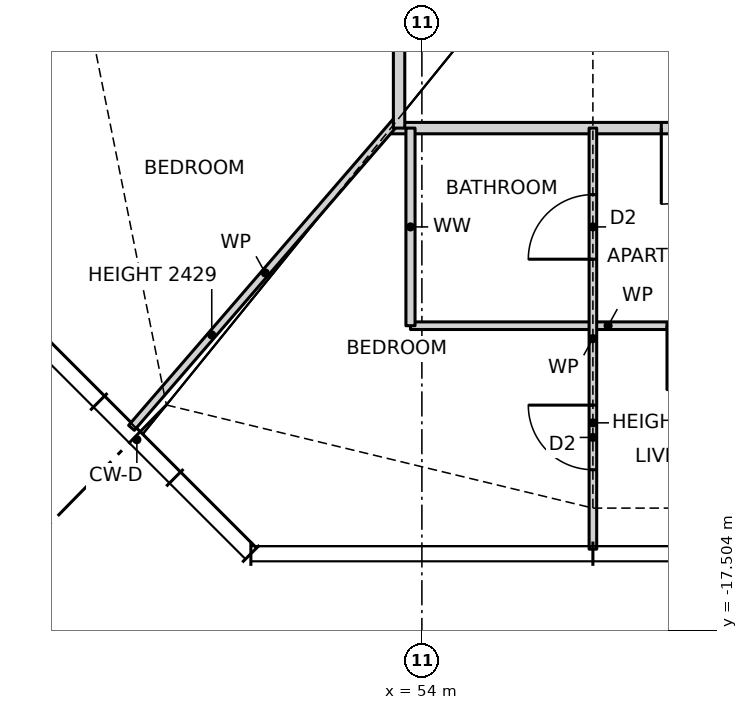
"""IFC4 building model, lengths in metres.
Left out: names, types, materials, properties, quantities, classifications, styles, units other than length and angle.
Written with IfcOpenShell. Run it as: python <this file> out.ifc"""

import sys

from ifc_helpers import new_model, si_unit, direction, frame, frame_2d, origin, place, context, subcontext, project, spatial, rectangle, extrude, element, fill, save


model = new_model("IFC4")
c1 = context("Model", 3, precision=1e-05, world=origin(), true_north=direction((0.0, 1.0)))
c2 = subcontext(c1, "Body", "Model", "MODEL_VIEW")
j1 = project(units=[si_unit("LENGTHUNIT", "METRE"), si_unit("PLANEANGLEUNIT", "RADIAN")], contexts=[c1])
p1 = place(None, origin())
s1 = spatial("IfcSite", under=j1, at=p1, CompositionType="ELEMENT")
p2 = place(p1, origin())
s2 = spatial("IfcBuilding", under=s1, at=p2, CompositionType="ELEMENT")
p3 = place(p2, frame((0.0, 0.0, 80.5)))
s3 = spatial("IfcBuildingStorey", under=s2, at=p3, CompositionType="ELEMENT", Elevation=80.5)
p4 = place(p3, frame((53.85, -13.5, 0.0), z_axis=(0.0, 0.0, 1.0), x_axis=(1.0, 0.0, 0.0)))
e1 = element("IfcWall", 1, at=p4, inside=s3, PredefinedType="PARTITIONING", context=c2, shape_type="SweptSolid", body=[
    extrude(rectangle(XDim=5.2, YDim=0.1, at=frame_2d((2.6, 0.0))), origin(), (0.0, 0.0, 1.0), 3.27),
])
p5 = place(p4, frame((3.375, 0.0, 0.0)))
e2 = element("IfcOpeningElement", 2, at=p5, cuts=e1, PredefinedType="OPENING", context=c2, shape_type="SweptSolid", body=[
    extrude(rectangle(XDim=0.85, YDim=2.1, at=frame_2d((0.425, 1.05))), frame((0.0, 0.06, 0.0), z_axis=(0.0, -1.0, 0.0), x_axis=(1.0, 0.0, 0.0)), (0.0, 0.0, 1.0), 0.12),
])
p6 = place(p3, frame((53.586, -10.9, 0.0), z_axis=(0.0, 0.0, 1.0), x_axis=(1.0, 0.0, 0.0)))
e3 = element("IfcWall", 3, at=p6, inside=s3, PredefinedType="PARTITIONING", context=c2, shape_type="SweptSolid", body=[
    extrude(rectangle(XDim=18.828, YDim=0.15, at=frame_2d((9.414, 0.0))), origin(), (0.0, 0.0, 1.0), 3.27),
])
p7 = place(p6, frame((3.564, 0.0, 0.0)))
e4 = element("IfcOpeningElement", 4, at=p7, cuts=e3, PredefinedType="OPENING", context=c2, shape_type="SweptSolid", body=[
    extrude(rectangle(XDim=1.0, YDim=2.1, at=frame_2d((0.5, 1.05))), frame((0.0, 0.085, 0.0), z_axis=(0.0, -1.0, 0.0), x_axis=(1.0, 0.0, 0.0)), (0.0, 0.0, 1.0), 0.17),
])
p8 = place(p6, frame((7.789, 0.0, 0.0)))
e5 = element("IfcOpeningElement", 5, at=p8, cuts=e3, PredefinedType="OPENING", context=c2, shape_type="SweptSolid", body=[
    extrude(rectangle(XDim=1.0, YDim=2.1, at=frame_2d((0.5, 1.05))), frame((0.0, 0.085, 0.0), z_axis=(0.0, -1.0, 0.0), x_axis=(1.0, 0.0, 0.0)), (0.0, 0.0, 1.0), 0.17),
])
p9 = place(p6, frame((12.564, 0.0, 0.0)))
e6 = element("IfcOpeningElement", 6, at=p9, cuts=e3, PredefinedType="OPENING", context=c2, shape_type="SweptSolid", body=[
    extrude(rectangle(XDim=1.0, YDim=2.1, at=frame_2d((0.5, 1.05))), frame((0.0, 0.085, 0.0), z_axis=(0.0, -1.0, 0.0), x_axis=(1.0, 0.0, 0.0)), (0.0, 0.0, 1.0), 0.17),
])
p10 = place(p3, frame((50.179, -14.844, 0.0), z_axis=(0.0, 0.0, 1.0), x_axis=(0.653713095188, 0.756742485381, 0.0)))
e7 = element("IfcWall", 7, at=p10, inside=s3, PredefinedType="PARTITIONING", context=c2, shape_type="SweptSolid", body=[
    extrude(rectangle(XDim=5.386, YDim=0.1, at=frame_2d((2.693, 0.0))), origin(), (0.0, 0.0, 1.0), 2.429),
])
p11 = place(p3, frame((56.25, -16.44, 0.0), z_axis=(0.0, 0.0, 1.0), x_axis=(0.0, 1.0, 0.0)))
e8 = element("IfcWall", 8, at=p11, inside=s3, PredefinedType="PARTITIONING", context=c2, shape_type="SweptSolid", body=[
    extrude(rectangle(XDim=5.54, YDim=0.1, at=frame_2d((2.77, 0.0))), origin(), (0.0, 0.0, 1.0), 2.587),
])
p12 = place(p11, frame((3.815, 0.0, 0.0)))
e9 = element("IfcOpeningElement", 9, at=p12, cuts=e8, PredefinedType="OPENING", context=c2, shape_type="SweptSolid", body=[
    extrude(rectangle(XDim=0.85, YDim=2.1, at=frame_2d((0.425, 1.05))), frame((0.0, 0.06, 0.0), z_axis=(0.0, -1.0, 0.0), x_axis=(1.0, 0.0, 0.0)), (0.0, 0.0, 1.0), 0.12),
])
p13 = place(p11, frame((1.045, 0.0, 0.0)))
e10 = element("IfcOpeningElement", 10, at=p13, cuts=e8, PredefinedType="OPENING", context=c2, shape_type="SweptSolid", body=[
    extrude(rectangle(XDim=0.85, YDim=2.1, at=frame_2d((0.425, 1.05))), frame((0.0, 0.06, 0.0), z_axis=(0.0, -1.0, 0.0), x_axis=(1.0, 0.0, 0.0)), (0.0, 0.0, 1.0), 0.12),
])
p14 = place(p3, frame((53.85, -13.5, 0.0), z_axis=(0.0, 0.0, 1.0), x_axis=(0.0, 1.0, 0.0)))
e11 = element("IfcWall", 11, at=p14, inside=s3, PredefinedType="PARTITIONING", context=c2, shape_type="SweptSolid", body=[
    extrude(rectangle(XDim=2.6, YDim=0.12, at=frame_2d((1.3, 0.0))), origin(), (0.0, 0.0, 1.0), 3.27),
])
p15 = place(p3, frame((53.7, -10.9, 0.0), z_axis=(0.0, 0.0, 1.0), x_axis=(0.0, 1.0, 0.0)))
e12 = element("IfcWall", 12, at=p15, inside=s3, PredefinedType="PARTITIONING", context=c2, shape_type="SweptSolid", body=[
    extrude(rectangle(XDim=21.668, YDim=0.15, at=frame_2d((10.834, 0.0))), origin(), (0.0, 0.0, 1.0), 3.27),
])
p16 = place(p15, frame((18.0, 0.0, 0.0)))
e13 = element("IfcOpeningElement", 13, at=p16, cuts=e12, PredefinedType="OPENING", context=c2, shape_type="SweptSolid", body=[
    extrude(rectangle(XDim=1.0, YDim=2.1, at=frame_2d((0.5, 1.05))), frame((0.0, 0.085, 0.0), z_axis=(0.0, -1.0, 0.0), x_axis=(1.0, 0.0, 0.0)), (0.0, 0.0, 1.0), 0.17),
])
p17 = place(p15, frame((5.4, 0.0, 0.0)))
e14 = element("IfcOpeningElement", 14, at=p17, cuts=e12, PredefinedType="OPENING", context=c2, shape_type="SweptSolid", body=[
    extrude(rectangle(XDim=1.0, YDim=2.1, at=frame_2d((0.5, 1.05))), frame((0.0, 0.085, 0.0), z_axis=(0.0, -1.0, 0.0), x_axis=(1.0, 0.0, 0.0)), (0.0, 0.0, 1.0), 0.17),
])
p18 = place(p7, frame((1.0, 0.0, 0.0), z_axis=(0.0, 0.0, 1.0), x_axis=(-1.0, 0.0, 0.0)))
e15 = element("IfcDoor", 15, at=p18, inside=s3, OperationType="SINGLE_SWING_RIGHT", PredefinedType="DOOR", context=c2, shape_type="SweptSolid", body=[
    extrude(rectangle(XDim=1.0, YDim=2.1, at=frame_2d((0.5, 1.05))), frame((0.0, 0.025, 0.0), z_axis=(0.0, -1.0, 0.0), x_axis=(1.0, 0.0, 0.0)), (0.0, 0.0, 1.0), 0.05),
])
fill(e4, e15)
p19 = place(p5, frame((0.85, 0.0, 0.0), z_axis=(0.0, 0.0, 1.0), x_axis=(-1.0, 0.0, 0.0)))
e16 = element("IfcDoor", 16, at=p19, inside=s3, OperationType="SINGLE_SWING_RIGHT", PredefinedType="DOOR", context=c2, shape_type="SweptSolid", body=[
    extrude(rectangle(XDim=0.85, YDim=2.1, at=frame_2d((0.425, 1.05))), frame((0.0, 0.025, 0.0), z_axis=(0.0, -1.0, 0.0), x_axis=(1.0, 0.0, 0.0)), (0.0, 0.0, 1.0), 0.05),
])
fill(e2, e16)
p20 = place(p12, origin())
e17 = element("IfcDoor", 17, at=p20, inside=s3, OperationType="SINGLE_SWING_LEFT", PredefinedType="DOOR", context=c2, shape_type="SweptSolid", body=[
    extrude(rectangle(XDim=0.85, YDim=2.1, at=frame_2d((0.425, 1.05))), frame((0.0, 0.025, 0.0), z_axis=(0.0, -1.0, 0.0), x_axis=(1.0, 0.0, 0.0)), (0.0, 0.0, 1.0), 0.05),
])
fill(e9, e17)
p21 = place(p13, origin())
e18 = element("IfcDoor", 18, at=p21, inside=s3, OperationType="SINGLE_SWING_RIGHT", PredefinedType="DOOR", context=c2, shape_type="SweptSolid", body=[
    extrude(rectangle(XDim=0.85, YDim=2.1, at=frame_2d((0.425, 1.05))), frame((0.0, 0.025, 0.0), z_axis=(0.0, -1.0, 0.0), x_axis=(1.0, 0.0, 0.0)), (0.0, 0.0, 1.0), 0.05),
])
fill(e10, e18)
save(model, sys.argv[1])
